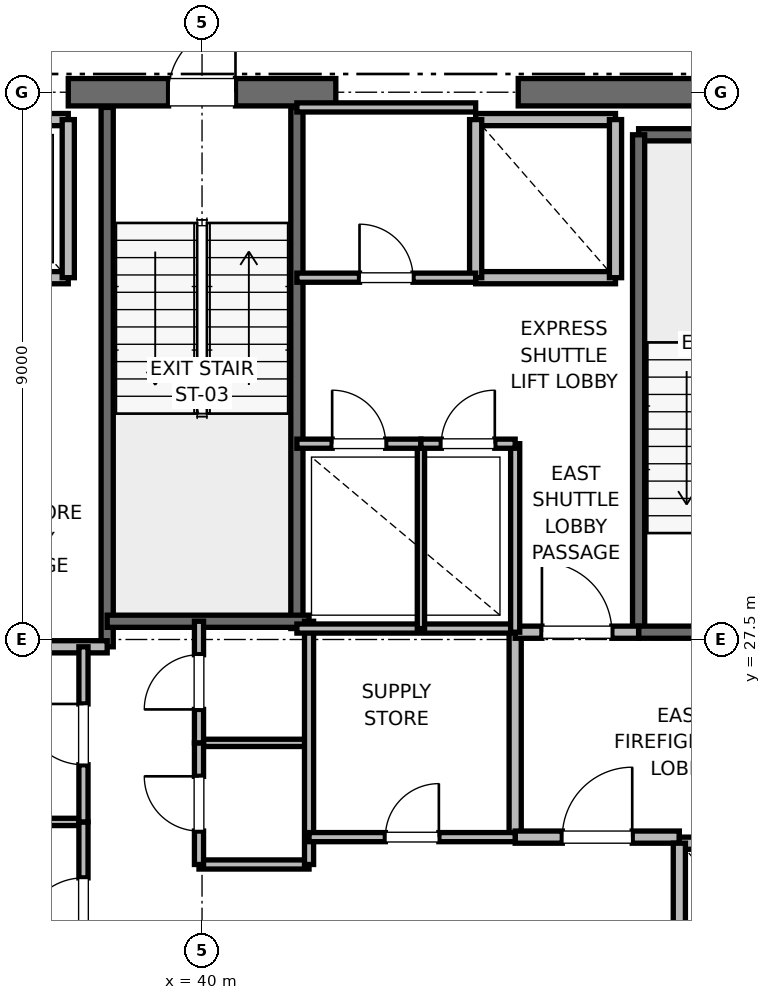
"""IFC4 building model, lengths in metres.
Left out: names, types, materials, properties, quantities, classifications, styles, units other than length and angle.
Written with IfcOpenShell. Run it as: python <this file> out.ifc"""

import sys

from ifc_helpers import new_model, si_unit, direction, frame, frame_2d, origin, place, context, subcontext, project, spatial, rectangle, extrude, element, fill, save


model = new_model("IFC4")
c1 = context("Model", 3, precision=1e-05, world=origin(), true_north=direction((0.0, 1.0)))
c2 = subcontext(c1, "Body", "Model", "MODEL_VIEW")
j1 = project(units=[si_unit("LENGTHUNIT", "METRE"), si_unit("PLANEANGLEUNIT", "RADIAN")], contexts=[c1])
p1 = place(None, origin())
s1 = spatial("IfcSite", under=j1, at=p1, CompositionType="ELEMENT")
p2 = place(p1, origin())
s2 = spatial("IfcBuilding", under=s1, at=p2, CompositionType="ELEMENT")
p3 = place(p2, frame((0.0, 0.0, 271.2)))
s3 = spatial("IfcBuildingStorey", under=s2, at=p3, CompositionType="ELEMENT", Elevation=271.2)
p4 = place(p3, frame((37.8, 36.5, 0.0), z_axis=(0.0, 0.0, 1.0), x_axis=(1.0, 0.0, 0.0)))
e1 = element("IfcWall", 1, at=p4, inside=s3, PredefinedType="SHEAR", context=c2, shape_type="SweptSolid", body=[
    extrude(rectangle(XDim=4.4, YDim=0.45, at=frame_2d((2.2, 0.0))), origin(), (0.0, 0.0, 1.0), 3.785),
])
p5 = place(p4, frame((1.65, 0.0, 0.0)))
e2 = element("IfcOpeningElement", 2, at=p5, cuts=e1, PredefinedType="OPENING", context=c2, shape_type="SweptSolid", body=[
    extrude(rectangle(XDim=1.1, YDim=2.15, at=frame_2d((0.55, 1.075))), frame((0.0, 0.225, 0.0), z_axis=(0.0, -1.0, 0.0), x_axis=(1.0, 0.0, 0.0)), (0.0, 0.0, 1.0), 0.45),
])
p6 = place(p3, frame((45.2, 36.5, 0.0), z_axis=(0.0, 0.0, 1.0), x_axis=(1.0, 0.0, 0.0)))
e3 = element("IfcWall", 3, at=p6, inside=s3, PredefinedType="SHEAR", context=c2, shape_type="SweptSolid", body=[
    extrude(rectangle(XDim=5.8, YDim=0.45, at=frame_2d((2.9, 0.0))), origin(), (0.0, 0.0, 1.0), 3.785),
])
p7 = place(p3, frame((47.18, 35.8, 0.0), z_axis=(0.0, 0.0, 1.0), x_axis=(1.0, 0.0, 0.0)))
e4 = element("IfcWall", 4, at=p7, inside=s3, PredefinedType="SOLIDWALL", context=c2, shape_type="SweptSolid", body=[
    extrude(rectangle(XDim=3.12, YDim=0.2, at=frame_2d((1.56, 0.0))), origin(), (0.0, 0.0, 1.0), 3.785),
])
p8 = place(p3, frame((47.18, 27.62, 0.0), z_axis=(0.0, 0.0, 1.0), x_axis=(0.0, 1.0, 0.0)))
e5 = element("IfcWall", 5, at=p8, inside=s3, PredefinedType="SOLIDWALL", context=c2, shape_type="SweptSolid", body=[
    extrude(rectangle(XDim=8.18, YDim=0.2, at=frame_2d((4.09, 0.0))), origin(), (0.0, 0.0, 1.0), 3.785),
])
p9 = place(p3, frame((47.18, 27.62, 0.0), z_axis=(0.0, 0.0, 1.0), x_axis=(1.0, 0.0, 0.0)))
e6 = element("IfcWall", 6, at=p9, inside=s3, PredefinedType="SOLIDWALL", context=c2, shape_type="SweptSolid", body=[
    extrude(rectangle(XDim=3.12, YDim=0.2, at=frame_2d((1.56, 0.0))), origin(), (0.0, 0.0, 1.0), 3.785),
])
p10 = place(p9, frame((1.01, 0.0, 0.0)))
e7 = element("IfcOpeningElement", 7, at=p10, cuts=e6, PredefinedType="OPENING", context=c2, shape_type="SweptSolid", body=[
    extrude(rectangle(XDim=1.1, YDim=2.15, at=frame_2d((0.55, 1.075))), frame((0.0, 0.1, 0.0), z_axis=(0.0, -1.0, 0.0), x_axis=(1.0, 0.0, 0.0)), (0.0, 0.0, 1.0), 0.2),
])
p11 = place(p3, frame((38.44, 27.38, 0.0), z_axis=(0.0, 0.0, 1.0), x_axis=(0.0, 1.0, 0.0)))
e8 = element("IfcWall", 8, at=p11, inside=s3, PredefinedType="SOLIDWALL", context=c2, shape_type="SweptSolid", body=[
    extrude(rectangle(XDim=8.87, YDim=0.2, at=frame_2d((4.435, 0.0))), origin(), (0.0, 0.0, 1.0), 3.785),
])
p12 = place(p3, frame((41.56, 27.68, 0.0), z_axis=(0.0, 0.0, 1.0), x_axis=(0.0, 1.0, 0.0)))
e9 = element("IfcWall", 9, at=p12, inside=s3, PredefinedType="SOLIDWALL", context=c2, shape_type="SweptSolid", body=[
    extrude(rectangle(XDim=8.57, YDim=0.2, at=frame_2d((4.285, 0.0))), origin(), (0.0, 0.0, 1.0), 3.785),
])
p13 = place(p3, frame((38.44, 27.8, 0.0), z_axis=(0.0, 0.0, 1.0), x_axis=(1.0, 0.0, 0.0)))
e10 = element("IfcWall", 10, at=p13, inside=s3, PredefinedType="SOLIDWALL", context=c2, shape_type="SweptSolid", body=[
    extrude(rectangle(XDim=3.32, YDim=0.2, at=frame_2d((1.66, 0.0))), origin(), (0.0, 0.0, 1.0), 3.785),
])
p14 = place(p3, frame((32.82, 27.38, 0.0), z_axis=(0.0, 0.0, 1.0), x_axis=(1.0, 0.0, 0.0)))
e11 = element("IfcWall", 11, at=p14, inside=s3, PredefinedType="PARTITIONING", context=c2, shape_type="SweptSolid", body=[
    extrude(rectangle(XDim=5.62, YDim=0.2, at=frame_2d((2.81, 0.0))), origin(), (0.0, 0.0, 1.0), 3.785),
])
p15 = place(p3, frame((45.15, 24.25, 0.0), z_axis=(0.0, 0.0, 1.0), x_axis=(0.0, 1.0, 0.0)))
e12 = element("IfcWall", 12, at=p15, inside=s3, PredefinedType="PARTITIONING", context=c2, shape_type="SweptSolid", body=[
    extrude(rectangle(XDim=3.37, YDim=0.2, at=frame_2d((1.685, 0.0))), origin(), (0.0, 0.0, 1.0), 3.785),
])
p16 = place(p3, frame((45.15, 24.25, 0.0), z_axis=(0.0, 0.0, 1.0), x_axis=(1.0, 0.0, 0.0)))
e13 = element("IfcWall", 13, at=p16, inside=s3, PredefinedType="PARTITIONING", context=c2, shape_type="SweptSolid", body=[
    extrude(rectangle(XDim=2.7, YDim=0.2, at=frame_2d((1.35, 0.0))), origin(), (0.0, 0.0, 1.0), 3.785),
])
p17 = place(p16, frame((0.775, 0.0, 0.0)))
e14 = element("IfcOpeningElement", 14, at=p17, cuts=e13, PredefinedType="OPENING", context=c2, shape_type="SweptSolid", body=[
    extrude(rectangle(XDim=1.15, YDim=2.2, at=frame_2d((0.575, 1.1))), frame((0.0, 0.1, 0.0), z_axis=(0.0, -1.0, 0.0), x_axis=(1.0, 0.0, 0.0)), (0.0, 0.0, 1.0), 0.2),
])
p18 = place(p3, frame((45.15, 27.62, 0.0), z_axis=(0.0, 0.0, 1.0), x_axis=(1.0, 0.0, 0.0)))
e15 = element("IfcWall", 15, at=p18, inside=s3, PredefinedType="PARTITIONING", context=c2, shape_type="SweptSolid", body=[
    extrude(rectangle(XDim=2.03, YDim=0.2, at=frame_2d((1.015, 0.0))), origin(), (0.0, 0.0, 1.0), 3.785),
])
p19 = place(p18, frame((0.44, 0.0, 0.0)))
e16 = element("IfcOpeningElement", 16, at=p19, cuts=e15, PredefinedType="OPENING", context=c2, shape_type="SweptSolid", body=[
    extrude(rectangle(XDim=1.15, YDim=2.2, at=frame_2d((0.575, 1.1))), frame((0.0, 0.1, 0.0), z_axis=(0.0, -1.0, 0.0), x_axis=(1.0, 0.0, 0.0)), (0.0, 0.0, 1.0), 0.2),
])
p20 = place(p3, frame((50.45, 24.15, 0.0), z_axis=(0.0, 0.0, 1.0), x_axis=(-1.0, 0.0, 0.0)))
e17 = element("IfcWall", 17, at=p20, inside=s3, PredefinedType="SOLIDWALL", context=c2, shape_type="SweptSolid", body=[
    extrude(rectangle(XDim=2.6, YDim=0.2, at=frame_2d((1.3, 0.0))), origin(), (0.0, 0.0, 1.0), 2.865),
])
p21 = place(p20, frame((0.75, 0.0, 0.0)))
e18 = element("IfcOpeningElement", 18, at=p21, cuts=e17, PredefinedType="OPENING", context=c2, shape_type="SweptSolid", body=[
    extrude(rectangle(XDim=1.1, YDim=2.2, at=frame_2d((0.55, 1.1))), frame((0.0, 0.1, 0.0), z_axis=(0.0, -1.0, 0.0), x_axis=(1.0, 0.0, 0.0)), (0.0, 0.0, 1.0), 0.2),
])
p22 = place(p3, frame((47.85, 24.15, 0.0), z_axis=(0.0, 0.0, 1.0), x_axis=(0.0, -1.0, 0.0)))
e19 = element("IfcWall", 19, at=p22, inside=s3, PredefinedType="SOLIDWALL", context=c2, shape_type="SweptSolid", body=[
    extrude(rectangle(XDim=3.0, YDim=0.2, at=frame_2d((1.5, 0.0))), origin(), (0.0, 0.0, 1.0), 3.785),
])
p23 = place(p3, frame((35.5, 33.45, 0.0), z_axis=(0.0, 0.0, 1.0), x_axis=(1.0, 0.0, 0.0)))
e20 = element("IfcWall", 20, at=p23, inside=s3, PredefinedType="SOLIDWALL", context=c2, shape_type="SweptSolid", body=[
    extrude(rectangle(XDim=2.3, YDim=0.2, at=frame_2d((1.15, 0.0))), origin(), (0.0, 0.0, 1.0), 3.785),
])
p24 = place(p23, frame((0.6, 0.0, 0.0)))
e21 = element("IfcOpeningElement", 21, at=p24, cuts=e20, PredefinedType="OPENING", context=c2, shape_type="SweptSolid", body=[
    extrude(rectangle(XDim=1.1, YDim=2.2, at=frame_2d((0.55, 1.1))), frame((0.0, 0.1, 0.0), z_axis=(0.0, -1.0, 0.0), x_axis=(1.0, 0.0, 0.0)), (0.0, 0.0, 1.0), 0.2),
])
p25 = place(p3, frame((37.8, 36.05, 0.0), z_axis=(0.0, 0.0, 1.0), x_axis=(-1.0, 0.0, 0.0)))
e22 = element("IfcWall", 22, at=p25, inside=s3, PredefinedType="SOLIDWALL", context=c2, shape_type="SweptSolid", body=[
    extrude(rectangle(XDim=2.3, YDim=0.2, at=frame_2d((1.15, 0.0))), origin(), (0.0, 0.0, 1.0), 2.865),
])
p26 = place(p3, frame((37.8, 33.45, 0.0), z_axis=(0.0, 0.0, 1.0), x_axis=(0.0, 1.0, 0.0)))
e23 = element("IfcWall", 23, at=p26, inside=s3, PredefinedType="SOLIDWALL", context=c2, shape_type="SweptSolid", body=[
    extrude(rectangle(XDim=2.6, YDim=0.2, at=frame_2d((1.3, 0.0))), origin(), (0.0, 0.0, 1.0), 2.865),
])
p27 = place(p3, frame((44.5, 33.45, 0.0), z_axis=(0.0, 0.0, 1.0), x_axis=(1.0, 0.0, 0.0)))
e24 = element("IfcWall", 24, at=p27, inside=s3, PredefinedType="SOLIDWALL", context=c2, shape_type="SweptSolid", body=[
    extrude(rectangle(XDim=2.3, YDim=0.2, at=frame_2d((1.15, 0.0))), origin(), (0.0, 0.0, 1.0), 3.785),
])
p28 = place(p3, frame((46.8, 36.05, 0.0), z_axis=(0.0, 0.0, 1.0), x_axis=(-1.0, 0.0, 0.0)))
e25 = element("IfcWall", 25, at=p28, inside=s3, PredefinedType="SOLIDWALL", context=c2, shape_type="SweptSolid", body=[
    extrude(rectangle(XDim=2.3, YDim=0.2, at=frame_2d((1.15, 0.0))), origin(), (0.0, 0.0, 1.0), 2.865),
])
p29 = place(p3, frame((44.5, 36.05, 0.0), z_axis=(0.0, 0.0, 1.0), x_axis=(0.0, -1.0, 0.0)))
e26 = element("IfcWall", 26, at=p29, inside=s3, PredefinedType="SOLIDWALL", context=c2, shape_type="SweptSolid", body=[
    extrude(rectangle(XDim=2.6, YDim=0.2, at=frame_2d((1.3, 0.0))), origin(), (0.0, 0.0, 1.0), 2.865),
])
p30 = place(p3, frame((46.8, 33.45, 0.0), z_axis=(0.0, 0.0, 1.0), x_axis=(0.0, 1.0, 0.0)))
e27 = element("IfcWall", 27, at=p30, inside=s3, PredefinedType="SOLIDWALL", context=c2, shape_type="SweptSolid", body=[
    extrude(rectangle(XDim=2.6, YDim=0.2, at=frame_2d((1.3, 0.0))), origin(), (0.0, 0.0, 1.0), 3.785),
])
p31 = place(p3, frame((39.95, 23.8, 0.0), z_axis=(0.0, 0.0, 1.0), x_axis=(1.0, 0.0, 0.0)))
e28 = element("IfcWall", 28, at=p31, inside=s3, PredefinedType="PARTITIONING", context=c2, shape_type="SweptSolid", body=[
    extrude(rectangle(XDim=1.81, YDim=0.15, at=frame_2d((0.905, 0.0))), origin(), (0.0, 0.0, 1.0), 2.85),
])
p32 = place(p3, frame((39.95, 25.8, 0.0), z_axis=(0.0, 0.0, 1.0), x_axis=(1.0, 0.0, 0.0)))
e29 = element("IfcWall", 29, at=p32, inside=s3, PredefinedType="PARTITIONING", context=c2, shape_type="SweptSolid", body=[
    extrude(rectangle(XDim=1.81, YDim=0.12, at=frame_2d((0.905, 0.0))), origin(), (0.0, 0.0, 1.0), 2.85),
])
p33 = place(p3, frame((41.76, 23.8, 0.0), z_axis=(0.0, 0.0, 1.0), x_axis=(0.0, 1.0, 0.0)))
e30 = element("IfcWall", 30, at=p33, inside=s3, PredefinedType="PARTITIONING", context=c2, shape_type="SweptSolid", body=[
    extrude(rectangle(XDim=4.0, YDim=0.15, at=frame_2d((2.0, 0.0))), origin(), (0.0, 0.0, 1.0), 2.85),
])
p34 = place(p3, frame((39.95, 23.8, 0.0), z_axis=(0.0, 0.0, 1.0), x_axis=(0.0, 1.0, 0.0)))
e31 = element("IfcWall", 31, at=p34, inside=s3, PredefinedType="PARTITIONING", context=c2, shape_type="SweptSolid", body=[
    extrude(rectangle(XDim=2.0, YDim=0.15, at=frame_2d((1.0, 0.0))), origin(), (0.0, 0.0, 1.0), 2.85),
])
p35 = place(p34, frame((0.55, 0.0, 0.0)))
e32 = element("IfcOpeningElement", 32, at=p35, cuts=e31, PredefinedType="OPENING", context=c2, shape_type="SweptSolid", body=[
    extrude(rectangle(XDim=0.9, YDim=2.1, at=frame_2d((0.45, 1.05))), frame((0.0, 0.075, 0.0), z_axis=(0.0, -1.0, 0.0), x_axis=(1.0, 0.0, 0.0)), (0.0, 0.0, 1.0), 0.15),
])
p36 = place(p3, frame((39.95, 25.8, 0.0), z_axis=(0.0, 0.0, 1.0), x_axis=(0.0, 1.0, 0.0)))
e33 = element("IfcWall", 33, at=p36, inside=s3, PredefinedType="PARTITIONING", context=c2, shape_type="SweptSolid", body=[
    extrude(rectangle(XDim=2.0, YDim=0.15, at=frame_2d((1.0, 0.0))), origin(), (0.0, 0.0, 1.0), 2.85),
])
p37 = place(p36, frame((0.55, 0.0, 0.0)))
e34 = element("IfcOpeningElement", 34, at=p37, cuts=e33, PredefinedType="OPENING", context=c2, shape_type="SweptSolid", body=[
    extrude(rectangle(XDim=0.9, YDim=2.1, at=frame_2d((0.45, 1.05))), frame((0.0, 0.075, 0.0), z_axis=(0.0, -1.0, 0.0), x_axis=(1.0, 0.0, 0.0)), (0.0, 0.0, 1.0), 0.15),
])
p38 = place(p3, frame((32.82, 24.5, 0.0), z_axis=(0.0, 0.0, 1.0), x_axis=(1.0, 0.0, 0.0)))
e35 = element("IfcWall", 35, at=p38, inside=s3, PredefinedType="PARTITIONING", context=c2, shape_type="SweptSolid", body=[
    extrude(rectangle(XDim=5.23, YDim=0.12, at=frame_2d((2.615, 0.0))), origin(), (0.0, 0.0, 1.0), 2.85),
])
p39 = place(p3, frame((38.05, 21.66, 0.0), z_axis=(0.0, 0.0, 1.0), x_axis=(0.0, 1.0, 0.0)))
e36 = element("IfcWall", 36, at=p39, inside=s3, PredefinedType="PARTITIONING", context=c2, shape_type="SweptSolid", body=[
    extrude(rectangle(XDim=2.84, YDim=0.15, at=frame_2d((1.42, 0.0))), origin(), (0.0, 0.0, 1.0), 2.85),
])
p40 = place(p39, frame((0.92, 0.0, 0.0)))
e37 = element("IfcOpeningElement", 37, at=p40, cuts=e36, PredefinedType="OPENING", context=c2, shape_type="SweptSolid", body=[
    extrude(rectangle(XDim=1.0, YDim=2.15, at=frame_2d((0.5, 1.075))), frame((0.0, 0.075, 0.0), z_axis=(0.0, -1.0, 0.0), x_axis=(1.0, 0.0, 0.0)), (0.0, 0.0, 1.0), 0.15),
])
p41 = place(p3, frame((38.05, 24.5, 0.0), z_axis=(0.0, 0.0, 1.0), x_axis=(0.0, 1.0, 0.0)))
e38 = element("IfcWall", 38, at=p41, inside=s3, PredefinedType="PARTITIONING", context=c2, shape_type="SweptSolid", body=[
    extrude(rectangle(XDim=2.88, YDim=0.15, at=frame_2d((1.44, 0.0))), origin(), (0.0, 0.0, 1.0), 2.85),
])
p42 = place(p41, frame((0.94, 0.0, 0.0)))
e39 = element("IfcOpeningElement", 39, at=p42, cuts=e38, PredefinedType="OPENING", context=c2, shape_type="SweptSolid", body=[
    extrude(rectangle(XDim=1.0, YDim=2.15, at=frame_2d((0.5, 1.075))), frame((0.0, 0.075, 0.0), z_axis=(0.0, -1.0, 0.0), x_axis=(1.0, 0.0, 0.0)), (0.0, 0.0, 1.0), 0.15),
])
p43 = place(p3, frame((41.56, 27.68, 0.0), z_axis=(0.0, 0.0, 1.0), x_axis=(1.0, 0.0, 0.0)))
e40 = element("IfcWall", 40, at=p43, inside=s3, PredefinedType="PARTITIONING", context=c2, shape_type="SweptSolid", body=[
    extrude(rectangle(XDim=3.59, YDim=0.15, at=frame_2d((1.795, 0.0))), origin(), (0.0, 0.0, 1.0), 2.85),
])
p44 = place(p3, frame((41.76, 24.25, 0.0), z_axis=(0.0, 0.0, 1.0), x_axis=(1.0, 0.0, 0.0)))
e41 = element("IfcWall", 41, at=p44, inside=s3, PredefinedType="PARTITIONING", context=c2, shape_type="SweptSolid", body=[
    extrude(rectangle(XDim=3.39, YDim=0.15, at=frame_2d((1.695, 0.0))), origin(), (0.0, 0.0, 1.0), 2.85),
])
p45 = place(p44, frame((1.255, 0.0, 0.0)))
e42 = element("IfcOpeningElement", 42, at=p45, cuts=e41, PredefinedType="OPENING", context=c2, shape_type="SweptSolid", body=[
    extrude(rectangle(XDim=0.88, YDim=2.1, at=frame_2d((0.44, 1.05))), frame((0.0, 0.075, 0.0), z_axis=(0.0, -1.0, 0.0), x_axis=(1.0, 0.0, 0.0)), (0.0, 0.0, 1.0), 0.15),
])
p46 = place(p3, frame((45.15, 27.62, 0.0), z_axis=(0.0, 0.0, 1.0), x_axis=(0.0, 1.0, 0.0)))
e43 = element("IfcWall", 43, at=p46, inside=s3, PredefinedType="PARTITIONING", context=c2, shape_type="SweptSolid", body=[
    extrude(rectangle(XDim=3.1, YDim=0.15, at=frame_2d((1.55, 0.0))), origin(), (0.0, 0.0, 1.0), 2.85),
])
p47 = place(p3, frame((43.6, 27.68, 0.0), z_axis=(0.0, 0.0, 1.0), x_axis=(0.0, 1.0, 0.0)))
e44 = element("IfcWall", 44, at=p47, inside=s3, PredefinedType="PARTITIONING", context=c2, shape_type="SweptSolid", body=[
    extrude(rectangle(XDim=3.04, YDim=0.12, at=frame_2d((1.52, 0.0))), origin(), (0.0, 0.0, 1.0), 2.85),
])
p48 = place(p3, frame((41.56, 30.72, 0.0), z_axis=(0.0, 0.0, 1.0), x_axis=(1.0, 0.0, 0.0)))
e45 = element("IfcWall", 45, at=p48, inside=s3, PredefinedType="PARTITIONING", context=c2, shape_type="SweptSolid", body=[
    extrude(rectangle(XDim=2.04, YDim=0.15, at=frame_2d((1.02, 0.0))), origin(), (0.0, 0.0, 1.0), 2.85),
])
p49 = place(p48, frame((0.58, 0.0, 0.0)))
e46 = element("IfcOpeningElement", 46, at=p49, cuts=e45, PredefinedType="OPENING", context=c2, shape_type="SweptSolid", body=[
    extrude(rectangle(XDim=0.88, YDim=2.1, at=frame_2d((0.44, 1.05))), frame((0.0, 0.075, 0.0), z_axis=(0.0, -1.0, 0.0), x_axis=(1.0, 0.0, 0.0)), (0.0, 0.0, 1.0), 0.15),
])
p50 = place(p3, frame((43.6, 30.72, 0.0), z_axis=(0.0, 0.0, 1.0), x_axis=(1.0, 0.0, 0.0)))
e47 = element("IfcWall", 47, at=p50, inside=s3, PredefinedType="PARTITIONING", context=c2, shape_type="SweptSolid", body=[
    extrude(rectangle(XDim=1.55, YDim=0.15, at=frame_2d((0.775, 0.0))), origin(), (0.0, 0.0, 1.0), 2.85),
])
p51 = place(p50, frame((0.335, 0.0, 0.0)))
e48 = element("IfcOpeningElement", 48, at=p51, cuts=e47, PredefinedType="OPENING", context=c2, shape_type="SweptSolid", body=[
    extrude(rectangle(XDim=0.88, YDim=2.1, at=frame_2d((0.44, 1.05))), frame((0.0, 0.075, 0.0), z_axis=(0.0, -1.0, 0.0), x_axis=(1.0, 0.0, 0.0)), (0.0, 0.0, 1.0), 0.15),
])
p52 = place(p3, frame((41.56, 36.25, 0.0), z_axis=(0.0, 0.0, 1.0), x_axis=(1.0, 0.0, 0.0)))
e49 = element("IfcWall", 49, at=p52, inside=s3, PredefinedType="PARTITIONING", context=c2, shape_type="SweptSolid", body=[
    extrude(rectangle(XDim=2.94, YDim=0.15, at=frame_2d((1.47, 0.0))), origin(), (0.0, 0.0, 1.0), 2.85),
])
p53 = place(p3, frame((41.56, 33.45, 0.0), z_axis=(0.0, 0.0, 1.0), x_axis=(1.0, 0.0, 0.0)))
e50 = element("IfcWall", 50, at=p53, inside=s3, PredefinedType="PARTITIONING", context=c2, shape_type="SweptSolid", body=[
    extrude(rectangle(XDim=2.94, YDim=0.15, at=frame_2d((1.47, 0.0))), origin(), (0.0, 0.0, 1.0), 2.85),
])
p54 = place(p53, frame((1.03, 0.0, 0.0)))
e51 = element("IfcOpeningElement", 51, at=p54, cuts=e50, PredefinedType="OPENING", context=c2, shape_type="SweptSolid", body=[
    extrude(rectangle(XDim=0.88, YDim=2.1, at=frame_2d((0.44, 1.05))), frame((0.0, 0.075, 0.0), z_axis=(0.0, -1.0, 0.0), x_axis=(1.0, 0.0, 0.0)), (0.0, 0.0, 1.0), 0.15),
])
p55 = place(p5, origin())
e52 = element("IfcDoor", 52, at=p55, inside=s3, OperationType="SINGLE_SWING_RIGHT", PredefinedType="DOOR", context=c2, shape_type="SweptSolid", body=[
    extrude(rectangle(XDim=1.1, YDim=2.15, at=frame_2d((0.55, 1.075))), frame((0.0, 0.025, 0.0), z_axis=(0.0, -1.0, 0.0), x_axis=(1.0, 0.0, 0.0)), (0.0, 0.0, 1.0), 0.05),
])
fill(e2, e52)
p56 = place(p17, origin())
e53 = element("IfcDoor", 53, at=p56, inside=s3, OperationType="SINGLE_SWING_RIGHT", PredefinedType="DOOR", context=c2, shape_type="SweptSolid", body=[
    extrude(rectangle(XDim=1.15, YDim=2.2, at=frame_2d((0.575, 1.1))), frame((0.0, 0.025, 0.0), z_axis=(0.0, -1.0, 0.0), x_axis=(1.0, 0.0, 0.0)), (0.0, 0.0, 1.0), 0.05),
])
fill(e14, e53)
p57 = place(p19, origin())
e54 = element("IfcDoor", 54, at=p57, inside=s3, OperationType="SINGLE_SWING_LEFT", PredefinedType="DOOR", context=c2, shape_type="SweptSolid", body=[
    extrude(rectangle(XDim=1.15, YDim=2.2, at=frame_2d((0.575, 1.1))), frame((0.0, 0.025, 0.0), z_axis=(0.0, -1.0, 0.0), x_axis=(1.0, 0.0, 0.0)), (0.0, 0.0, 1.0), 0.05),
])
fill(e16, e54)
p58 = place(p35, origin())
e55 = element("IfcDoor", 55, at=p58, inside=s3, OperationType="SINGLE_SWING_RIGHT", PredefinedType="DOOR", context=c2, shape_type="SweptSolid", body=[
    extrude(rectangle(XDim=0.9, YDim=2.1, at=frame_2d((0.45, 1.05))), frame((0.0, 0.025, 0.0), z_axis=(0.0, -1.0, 0.0), x_axis=(1.0, 0.0, 0.0)), (0.0, 0.0, 1.0), 0.05),
])
fill(e32, e55)
p59 = place(p37, origin())
e56 = element("IfcDoor", 56, at=p59, inside=s3, OperationType="SINGLE_SWING_LEFT", PredefinedType="DOOR", context=c2, shape_type="SweptSolid", body=[
    extrude(rectangle(XDim=0.9, YDim=2.1, at=frame_2d((0.45, 1.05))), frame((0.0, 0.025, 0.0), z_axis=(0.0, -1.0, 0.0), x_axis=(1.0, 0.0, 0.0)), (0.0, 0.0, 1.0), 0.05),
])
fill(e34, e56)
p60 = place(p40, origin())
e57 = element("IfcDoor", 57, at=p60, inside=s3, OperationType="SINGLE_SWING_LEFT", PredefinedType="DOOR", context=c2, shape_type="SweptSolid", body=[
    extrude(rectangle(XDim=1.0, YDim=2.15, at=frame_2d((0.5, 1.075))), frame((0.0, 0.025, 0.0), z_axis=(0.0, -1.0, 0.0), x_axis=(1.0, 0.0, 0.0)), (0.0, 0.0, 1.0), 0.05),
])
fill(e37, e57)
p61 = place(p42, origin())
e58 = element("IfcDoor", 58, at=p61, inside=s3, OperationType="SINGLE_SWING_RIGHT", PredefinedType="DOOR", context=c2, shape_type="SweptSolid", body=[
    extrude(rectangle(XDim=1.0, YDim=2.15, at=frame_2d((0.5, 1.075))), frame((0.0, 0.025, 0.0), z_axis=(0.0, -1.0, 0.0), x_axis=(1.0, 0.0, 0.0)), (0.0, 0.0, 1.0), 0.05),
])
fill(e39, e58)
p62 = place(p45, origin())
e59 = element("IfcDoor", 59, at=p62, inside=s3, OperationType="SINGLE_SWING_RIGHT", PredefinedType="DOOR", context=c2, shape_type="SweptSolid", body=[
    extrude(rectangle(XDim=0.88, YDim=2.1, at=frame_2d((0.44, 1.05))), frame((0.0, 0.025, 0.0), z_axis=(0.0, -1.0, 0.0), x_axis=(1.0, 0.0, 0.0)), (0.0, 0.0, 1.0), 0.05),
])
fill(e42, e59)
p63 = place(p49, origin())
e60 = element("IfcDoor", 60, at=p63, inside=s3, OperationType="SINGLE_SWING_LEFT", PredefinedType="DOOR", context=c2, shape_type="SweptSolid", body=[
    extrude(rectangle(XDim=0.88, YDim=2.1, at=frame_2d((0.44, 1.05))), frame((0.0, 0.025, 0.0), z_axis=(0.0, -1.0, 0.0), x_axis=(1.0, 0.0, 0.0)), (0.0, 0.0, 1.0), 0.05),
])
fill(e46, e60)
p64 = place(p51, origin())
e61 = element("IfcDoor", 61, at=p64, inside=s3, OperationType="SINGLE_SWING_RIGHT", PredefinedType="DOOR", context=c2, shape_type="SweptSolid", body=[
    extrude(rectangle(XDim=0.88, YDim=2.1, at=frame_2d((0.44, 1.05))), frame((0.0, 0.025, 0.0), z_axis=(0.0, -1.0, 0.0), x_axis=(1.0, 0.0, 0.0)), (0.0, 0.0, 1.0), 0.05),
])
fill(e48, e61)
p65 = place(p54, origin())
e62 = element("IfcDoor", 62, at=p65, inside=s3, OperationType="SINGLE_SWING_LEFT", PredefinedType="DOOR", context=c2, shape_type="SweptSolid", body=[
    extrude(rectangle(XDim=0.88, YDim=2.1, at=frame_2d((0.44, 1.05))), frame((0.0, 0.025, 0.0), z_axis=(0.0, -1.0, 0.0), x_axis=(1.0, 0.0, 0.0)), (0.0, 0.0, 1.0), 0.05),
])
fill(e51, e62)
save(model, sys.argv[1])
